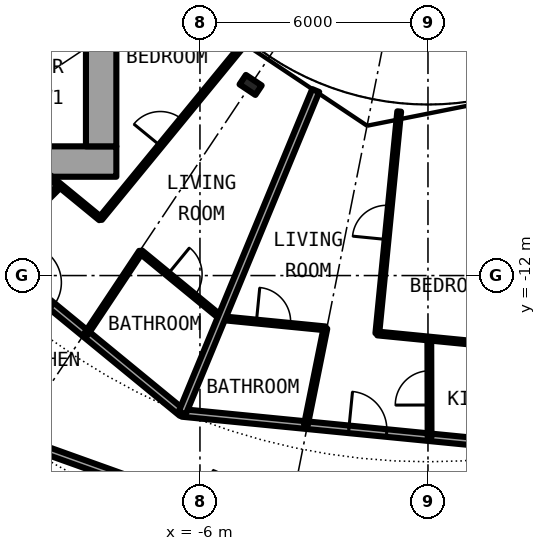
"""IFC4 building model, lengths in metres.
Left out: names, types, materials, properties, quantities, classifications, styles, units other than length and angle.
Written with IfcOpenShell. Run it as: python <this file> out.ifc"""

import sys

from ifc_helpers import new_model, si_unit, direction, frame, frame_2d, origin, origin_2d, place, context, subcontext, project, spatial, rectangle, i_section, extrude, element, fill, save


model = new_model("IFC4")
c1 = context("Model", 3, precision=1e-05, world=origin(), true_north=direction((0.0, 1.0)))
c2 = subcontext(c1, "Body", "Model", "MODEL_VIEW")
j1 = project(units=[si_unit("LENGTHUNIT", "METRE"), si_unit("PLANEANGLEUNIT", "RADIAN")], contexts=[c1])
p1 = place(None, origin())
s1 = spatial("IfcSite", under=j1, at=p1, CompositionType="ELEMENT")
p2 = place(p1, origin())
s2 = spatial("IfcBuilding", under=s1, at=p2, CompositionType="ELEMENT")
p3 = place(p2, frame((0.0, 0.0, 22.8)))
s3 = spatial("IfcBuildingStorey", under=s2, at=p3, CompositionType="ELEMENT", Elevation=22.8)
p4 = place(p3, frame((-4.667, -6.984, 0.0), z_axis=(0.0, 0.0, 1.0), x_axis=(-0.55557023302, -0.831469612303, 0.0)))
e1 = element("IfcColumn", 1, at=p4, inside=s3, PredefinedType="COLUMN", context=c2, shape_type="SweptSolid", body=[
    extrude(i_section(OverallWidth=0.3, OverallDepth=0.5, WebThickness=0.014, FlangeThickness=0.028, FilletRadius=0.027, at=origin_2d()), origin(), (0.0, 0.0, 1.0), 3.05),
])
p5 = place(p3, frame((-22.4, -9.0, 0.0), z_axis=(0.0, 0.0, 1.0), x_axis=(1.0, 0.0, 0.0)))
e2 = element("IfcWall", 2, at=p5, inside=s3, PredefinedType="SHEAR", context=c2, shape_type="SweptSolid", body=[
    extrude(rectangle(XDim=14.2, YDim=0.8, at=frame_2d((7.1, 0.0))), origin(), (0.0, 0.0, 1.0), 3.05),
])
p6 = place(p5, frame((1.325, 0.0, 0.0)))
e3 = element("IfcOpeningElement", 3, at=p6, cuts=e2, PredefinedType="OPENING", context=c2, shape_type="SweptSolid", body=[
    extrude(rectangle(XDim=1.2, YDim=2.3, at=frame_2d((0.6, 1.15))), frame((0.0, 0.41, 0.0), z_axis=(0.0, -1.0, 0.0), x_axis=(1.0, 0.0, 0.0)), (0.0, 0.0, 1.0), 0.82),
])
p7 = place(p3, frame((-8.6, 8.6, 0.0), z_axis=(0.0, 0.0, 1.0), x_axis=(0.0, -1.0, 0.0)))
e4 = element("IfcWall", 4, at=p7, inside=s3, PredefinedType="SHEAR", context=c2, shape_type="SweptSolid", body=[
    extrude(rectangle(XDim=17.2, YDim=0.8, at=frame_2d((8.6, 0.0))), origin(), (0.0, 0.0, 1.0), 3.05),
])
p8 = place(p7, frame((7.4, 0.0, 0.1)))
e5 = element("IfcOpeningElement", 5, at=p8, cuts=e4, PredefinedType="OPENING", context=c2, shape_type="SweptSolid", body=[
    extrude(rectangle(XDim=2.4, YDim=2.2, at=frame_2d((1.2, 1.1))), frame((0.0, 0.41, 0.0), z_axis=(0.0, -1.0, 0.0), x_axis=(1.0, 0.0, 0.0)), (0.0, 0.0, 1.0), 0.82),
])
p9 = place(p3, frame((-10.741, -16.35, 0.0), z_axis=(0.0, 0.0, 1.0), x_axis=(0.941539496009, -0.336902623105, 0.0)))
e6 = element("IfcWall", 6, at=p9, inside=s3, PredefinedType="PARTITIONING", context=c2, shape_type="SweptSolid", body=[
    extrude(rectangle(XDim=9.368, YDim=0.2, at=frame_2d((4.684, 0.0))), origin(), (0.0, 0.0, 1.0), 2.38),
])
p10 = place(p9, frame((5.057, 0.0, 0.0)))
e7 = element("IfcOpeningElement", 7, at=p10, cuts=e6, PredefinedType="OPENING", context=c2, shape_type="SweptSolid", body=[
    extrude(rectangle(XDim=1.0, YDim=2.3, at=frame_2d((0.5, 1.15))), frame((0.0, 0.11, 0.0), z_axis=(0.0, -1.0, 0.0), x_axis=(1.0, 0.0, 0.0)), (0.0, 0.0, 1.0), 0.22),
])
p11 = place(p3, frame((-14.038, -9.402, 0.0), z_axis=(0.0, 0.0, 1.0), x_axis=(0.773084654695, -0.634302858794, 0.0)))
e8 = element("IfcWall", 8, at=p11, inside=s3, PredefinedType="PARTITIONING", context=c2, shape_type="SweptSolid", body=[
    extrude(rectangle(XDim=9.793, YDim=0.2, at=frame_2d((4.896, 0.0))), origin(), (0.0, 0.0, 1.0), 2.7),
])
p12 = place(p11, frame((4.387, 0.0, 0.0)))
e9 = element("IfcOpeningElement", 9, at=p12, cuts=e8, PredefinedType="OPENING", context=c2, shape_type="SweptSolid", body=[
    extrude(rectangle(XDim=1.0, YDim=2.3, at=frame_2d((0.5, 1.15))), frame((0.0, 0.11, 0.0), z_axis=(0.0, -1.0, 0.0), x_axis=(1.0, 0.0, 0.0)), (0.0, 0.0, 1.0), 0.22),
])
p13 = place(p3, frame((-6.467, -15.615, 0.0), z_axis=(0.0, 0.0, 1.0), x_axis=(0.995201860711, -0.097843019361, 0.0)))
e10 = element("IfcWall", 10, at=p13, inside=s3, PredefinedType="PARTITIONING", context=c2, shape_type="SweptSolid", body=[
    extrude(rectangle(XDim=9.811, YDim=0.2, at=frame_2d((4.906, 0.0))), origin(), (0.0, 0.0, 1.0), 2.7),
])
p14 = place(p13, frame((4.405, 0.0, 0.0)))
e11 = element("IfcOpeningElement", 11, at=p14, cuts=e10, PredefinedType="OPENING", context=c2, shape_type="SweptSolid", body=[
    extrude(rectangle(XDim=1.0, YDim=2.3, at=frame_2d((0.5, 1.15))), frame((0.0, 0.11, 0.0), z_axis=(0.0, -1.0, 0.0), x_axis=(1.0, 0.0, 0.0)), (0.0, 0.0, 1.0), 0.22),
])
p15 = place(p3, frame((-9.971, -9.396, 0.0), z_axis=(0.0, 0.0, 1.0), x_axis=(0.77321028337, -0.634149712363, 0.0)))
e12 = element("IfcWall", 12, at=p15, inside=s3, PredefinedType="PARTITIONING", context=c2, shape_type="SweptSolid", body=[
    extrude(rectangle(XDim=1.749, YDim=0.1, at=frame_2d((0.874, 0.0))), origin(), (0.0, 0.0, 1.0), 2.7),
])
p16 = place(p3, frame((-7.558, -11.376, 0.0), z_axis=(0.0, 0.0, 1.0), x_axis=(0.773049907698, -0.634345205868, 0.0)))
e13 = element("IfcWall", 13, at=p16, inside=s3, PredefinedType="PARTITIONING", context=c2, shape_type="SweptSolid", body=[
    extrude(rectangle(XDim=2.748, YDim=0.1, at=frame_2d((1.374, 0.0))), origin(), (0.0, 0.0, 1.0), 2.7),
])
p17 = place(p16, frame((0.924, 0.0, 0.0)))
e14 = element("IfcOpeningElement", 14, at=p17, cuts=e13, PredefinedType="OPENING", context=c2, shape_type="SweptSolid", body=[
    extrude(rectangle(XDim=0.9, YDim=2.3, at=frame_2d((0.45, 1.15))), frame((0.0, 0.06, 0.0), z_axis=(0.0, -1.0, 0.0), x_axis=(1.0, 0.0, 0.0)), (0.0, 0.0, 1.0), 0.12),
])
p18 = place(p3, frame((-5.434, -13.12, 0.0), z_axis=(0.0, 0.0, 1.0), x_axis=(0.99520549403, -0.097806056318, 0.0)))
e15 = element("IfcWall", 15, at=p18, inside=s3, PredefinedType="PARTITIONING", context=c2, shape_type="SweptSolid", body=[
    extrude(rectangle(XDim=2.748, YDim=0.1, at=frame_2d((1.374, 0.0))), origin(), (0.0, 0.0, 1.0), 2.7),
])
p19 = place(p18, frame((0.924, 0.0, 0.0)))
e16 = element("IfcOpeningElement", 16, at=p19, cuts=e15, PredefinedType="OPENING", context=c2, shape_type="SweptSolid", body=[
    extrude(rectangle(XDim=0.9, YDim=2.3, at=frame_2d((0.45, 1.15))), frame((0.0, 0.06, 0.0), z_axis=(0.0, -1.0, 0.0), x_axis=(1.0, 0.0, 0.0)), (0.0, 0.0, 1.0), 0.12),
])
p20 = place(p3, frame((-1.33, -13.524, 0.0), z_axis=(0.0, 0.0, 1.0), x_axis=(0.995206960104, -0.097791137432, 0.0)))
e17 = element("IfcWall", 17, at=p20, inside=s3, PredefinedType="PARTITIONING", context=c2, shape_type="SweptSolid", body=[
    extrude(rectangle(XDim=4.122, YDim=0.1, at=frame_2d((2.061, 0.0))), origin(), (0.0, 0.0, 1.0), 2.7),
])
p21 = place(p3, frame((-11.524, -11.464, 0.0), z_axis=(0.0, 0.0, 1.0), x_axis=(0.708796844581, 0.705412668665, 0.0)))
e18 = element("IfcWall", 18, at=p21, inside=s3, PredefinedType="PARTITIONING", context=c2, shape_type="SweptSolid", body=[
    extrude(rectangle(XDim=2.597, YDim=0.1, at=frame_2d((1.299, 0.0))), origin(), (0.0, 0.0, 1.0), 2.7),
])
p22 = place(p21, frame((0.849, 0.0, 0.0)))
e19 = element("IfcOpeningElement", 19, at=p22, cuts=e18, PredefinedType="OPENING", context=c2, shape_type="SweptSolid", body=[
    extrude(rectangle(XDim=0.9, YDim=2.3, at=frame_2d((0.45, 1.15))), frame((0.0, 0.06, 0.0), z_axis=(0.0, -1.0, 0.0), x_axis=(1.0, 0.0, 0.0)), (0.0, 0.0, 1.0), 0.12),
])
p23 = place(p3, frame((-8.996, -13.539, 0.0), z_axis=(0.0, 0.0, 1.0), x_axis=(0.553615197403, 0.83277260594, 0.0)))
e20 = element("IfcWall", 20, at=p23, inside=s3, PredefinedType="PARTITIONING", context=c2, shape_type="SweptSolid", body=[
    extrude(rectangle(XDim=2.597, YDim=0.1, at=frame_2d((1.299, 0.0))), origin(), (0.0, 0.0, 1.0), 2.7),
])
p24 = place(p3, frame((-8.62, -10.504, 0.0), z_axis=(0.0, 0.0, 1.0), x_axis=(0.634358693064, 0.773038840249, 0.0)))
e21 = element("IfcWall", 21, at=p24, inside=s3, PredefinedType="PARTITIONING", context=c2, shape_type="SweptSolid", body=[
    extrude(rectangle(XDim=5.868, YDim=0.1, at=frame_2d((2.934, 0.0))), origin(), (0.0, 0.0, 1.0), 2.7),
])
p25 = place(p24, frame((2.484, 0.0, 0.0)))
e22 = element("IfcOpeningElement", 22, at=p25, cuts=e21, PredefinedType="OPENING", context=c2, shape_type="SweptSolid", body=[
    extrude(rectangle(XDim=0.9, YDim=2.3, at=frame_2d((0.45, 1.15))), frame((0.0, 0.06, 0.0), z_axis=(0.0, -1.0, 0.0), x_axis=(1.0, 0.0, 0.0)), (0.0, 0.0, 1.0), 0.12),
])
p26 = place(p3, frame((-6.467, -15.614, 0.0), z_axis=(0.0, 0.0, 1.0), x_axis=(0.382646942224, 0.923894646378, 0.0)))
e23 = element("IfcWall", 23, at=p26, inside=s3, PredefinedType="PARTITIONING", context=c2, shape_type="SweptSolid", body=[
    extrude(rectangle(XDim=9.181, YDim=0.2, at=frame_2d((4.59, 0.0))), origin(), (0.0, 0.0, 1.0), 2.7),
])
p27 = place(p3, frame((-3.213, -15.934, 0.0), z_axis=(0.0, 0.0, 1.0), x_axis=(0.197851046463, 0.980232096706, 0.0)))
e24 = element("IfcWall", 24, at=p27, inside=s3, PredefinedType="PARTITIONING", context=c2, shape_type="SweptSolid", body=[
    extrude(rectangle(XDim=2.597, YDim=0.1, at=frame_2d((1.299, 0.0))), origin(), (0.0, 0.0, 1.0), 2.7),
])
p28 = place(p3, frame((-1.333, -13.523, 0.0), z_axis=(0.0, 0.0, 1.0), x_axis=(0.098144281387, 0.995172196171, 0.0)))
e25 = element("IfcWall", 25, at=p28, inside=s3, PredefinedType="PARTITIONING", context=c2, shape_type="SweptSolid", body=[
    extrude(rectangle(XDim=5.868, YDim=0.1, at=frame_2d((2.934, 0.0))), origin(), (0.0, 0.0, 1.0), 2.7),
])
p29 = place(p28, frame((2.484, 0.0, 0.0)))
e26 = element("IfcOpeningElement", 26, at=p29, cuts=e25, PredefinedType="OPENING", context=c2, shape_type="SweptSolid", body=[
    extrude(rectangle(XDim=0.9, YDim=2.3, at=frame_2d((0.45, 1.15))), frame((0.0, 0.06, 0.0), z_axis=(0.0, -1.0, 0.0), x_axis=(1.0, 0.0, 0.0)), (0.0, 0.0, 1.0), 0.12),
])
p30 = place(p3, frame((0.042, -16.255, 0.0), z_axis=(0.0, 0.0, 1.0), x_axis=(-0.00272632248, 0.999996283576, 0.0)))
e27 = element("IfcWall", 27, at=p30, inside=s3, PredefinedType="PARTITIONING", context=c2, shape_type="SweptSolid", body=[
    extrude(rectangle(XDim=2.597, YDim=0.1, at=frame_2d((1.298, 0.0))), origin(), (0.0, 0.0, 1.0), 2.7),
])
p31 = place(p30, frame((0.849, 0.0, 0.0)))
e28 = element("IfcOpeningElement", 28, at=p31, cuts=e27, PredefinedType="OPENING", context=c2, shape_type="SweptSolid", body=[
    extrude(rectangle(XDim=0.9, YDim=2.3, at=frame_2d((0.45, 1.15))), frame((0.0, 0.06, 0.0), z_axis=(0.0, -1.0, 0.0), x_axis=(1.0, 0.0, 0.0)), (0.0, 0.0, 1.0), 0.12),
])
p32 = place(p12, origin())
e29 = element("IfcDoor", 29, at=p32, inside=s3, OperationType="SINGLE_SWING_LEFT", PredefinedType="DOOR", context=c2, shape_type="SweptSolid", body=[
    extrude(rectangle(XDim=1.0, YDim=2.3, at=frame_2d((0.5, 1.15))), frame((0.0, 0.025, 0.0), z_axis=(0.0, -1.0, 0.0), x_axis=(1.0, 0.0, 0.0)), (0.0, 0.0, 1.0), 0.05),
])
fill(e9, e29)
p33 = place(p17, origin())
e30 = element("IfcDoor", 30, at=p33, inside=s3, OperationType="SINGLE_SWING_LEFT", PredefinedType="DOOR", context=c2, shape_type="SweptSolid", body=[
    extrude(rectangle(XDim=0.9, YDim=2.3, at=frame_2d((0.45, 1.15))), frame((0.0, 0.025, 0.0), z_axis=(0.0, -1.0, 0.0), x_axis=(1.0, 0.0, 0.0)), (0.0, 0.0, 1.0), 0.05),
])
fill(e14, e30)
p34 = place(p25, origin())
e31 = element("IfcDoor", 31, at=p34, inside=s3, OperationType="SINGLE_SWING_RIGHT", PredefinedType="DOOR", context=c2, shape_type="SweptSolid", body=[
    extrude(rectangle(XDim=0.9, YDim=2.3, at=frame_2d((0.45, 1.15))), frame((0.0, 0.025, 0.0), z_axis=(0.0, -1.0, 0.0), x_axis=(1.0, 0.0, 0.0)), (0.0, 0.0, 1.0), 0.05),
])
fill(e22, e31)
p35 = place(p14, origin())
e32 = element("IfcDoor", 32, at=p35, inside=s3, OperationType="SINGLE_SWING_LEFT", PredefinedType="DOOR", context=c2, shape_type="SweptSolid", body=[
    extrude(rectangle(XDim=1.0, YDim=2.3, at=frame_2d((0.5, 1.15))), frame((0.0, 0.025, 0.0), z_axis=(0.0, -1.0, 0.0), x_axis=(1.0, 0.0, 0.0)), (0.0, 0.0, 1.0), 0.05),
])
fill(e11, e32)
p36 = place(p19, origin())
e33 = element("IfcDoor", 33, at=p36, inside=s3, OperationType="SINGLE_SWING_LEFT", PredefinedType="DOOR", context=c2, shape_type="SweptSolid", body=[
    extrude(rectangle(XDim=0.9, YDim=2.3, at=frame_2d((0.45, 1.15))), frame((0.0, 0.025, 0.0), z_axis=(0.0, -1.0, 0.0), x_axis=(1.0, 0.0, 0.0)), (0.0, 0.0, 1.0), 0.05),
])
fill(e16, e33)
p37 = place(p31, origin())
e34 = element("IfcDoor", 34, at=p37, inside=s3, OperationType="SINGLE_SWING_RIGHT", PredefinedType="DOOR", context=c2, shape_type="SweptSolid", body=[
    extrude(rectangle(XDim=0.9, YDim=2.3, at=frame_2d((0.45, 1.15))), frame((0.0, 0.025, 0.0), z_axis=(0.0, -1.0, 0.0), x_axis=(1.0, 0.0, 0.0)), (0.0, 0.0, 1.0), 0.05),
])
fill(e28, e34)
p38 = place(p29, origin())
e35 = element("IfcDoor", 35, at=p38, inside=s3, OperationType="SINGLE_SWING_RIGHT", PredefinedType="DOOR", context=c2, shape_type="SweptSolid", body=[
    extrude(rectangle(XDim=0.9, YDim=2.3, at=frame_2d((0.45, 1.15))), frame((0.0, 0.025, 0.0), z_axis=(0.0, -1.0, 0.0), x_axis=(1.0, 0.0, 0.0)), (0.0, 0.0, 1.0), 0.05),
])
fill(e26, e35)
save(model, sys.argv[1])
